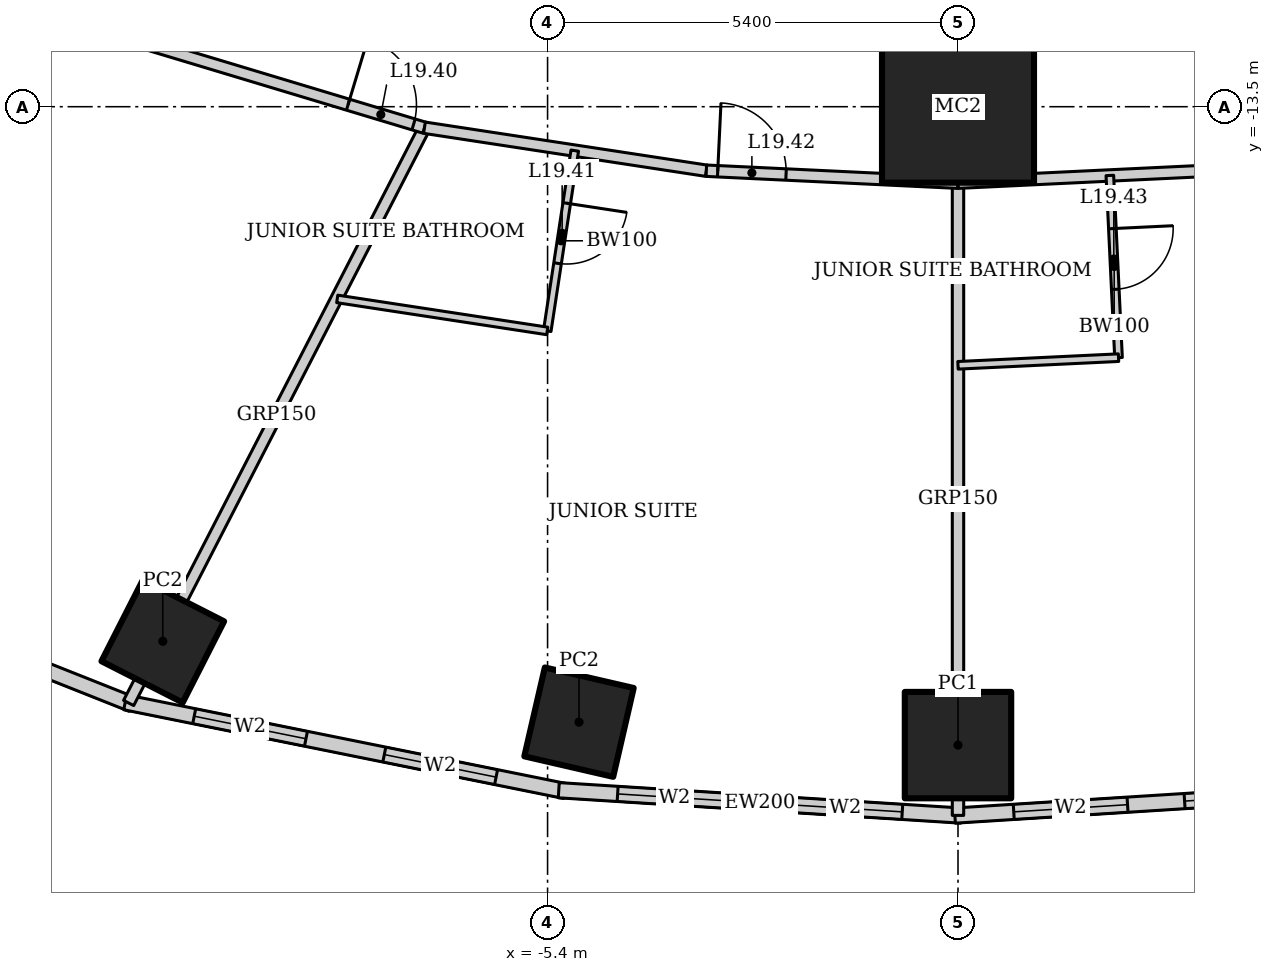
"""IFC4 building model, lengths in metres.
Left out: names, types, materials, properties, quantities, classifications, styles, units other than length and angle.
Written with IfcOpenShell. Run it as: python <this file> out.ifc"""

import sys

from ifc_helpers import new_model, si_unit, direction, frame, frame_2d, origin, origin_2d, place, context, subcontext, project, spatial, rectangle, hollow_rectangle, extrude, element, fill, save


model = new_model("IFC4")
c1 = context("Model", 3, precision=1e-05, world=origin(), true_north=direction((0.0, 1.0)))
c2 = subcontext(c1, "Body", "Model", "MODEL_VIEW")
j1 = project(units=[si_unit("LENGTHUNIT", "METRE"), si_unit("PLANEANGLEUNIT", "RADIAN")], contexts=[c1])
p1 = place(None, origin())
s1 = spatial("IfcSite", under=j1, at=p1, CompositionType="ELEMENT")
p2 = place(p1, origin())
s2 = spatial("IfcBuilding", under=s1, at=p2, CompositionType="ELEMENT")
p3 = place(p2, frame((0.0, 0.0, 83.8)))
s3 = spatial("IfcBuildingStorey", under=s2, at=p3, CompositionType="ELEMENT", Elevation=83.8)
p4 = place(p3, frame((0.0, -13.5, 0.0), z_axis=(0.0, 0.0, 1.0), x_axis=(1.0, 0.0, 0.0)))
e1 = element("IfcColumn", 1, at=p4, inside=s3, PredefinedType="COLUMN", context=c2, shape_type="SweptSolid", body=[
    extrude(hollow_rectangle(XDim=2.0, YDim=2.0, WallThickness=0.17, at=origin_2d()), origin(), (0.0, 0.0, 1.0), 3.6),
])
for number, where, z_axis, x_axis in (
    (2, (-10.463, -20.534, 0.0), (0.0, 0.0, 1.0), (0.454, 0.891, 0.0)),
    (3, (-4.986, -21.598, 0.0), (0.0, 0.0, 1.0), (0.225, 0.974, 0.0)),
):
    element("IfcColumn", number, at=place(p3, frame(where, z_axis=z_axis, x_axis=x_axis)), inside=s3, PredefinedType="COLUMN", context=c2, shape_type="SweptSolid", body=[
        extrude(hollow_rectangle(XDim=1.2, YDim=1.2, WallThickness=0.1, at=origin_2d()), origin(), (0.0, 0.0, 1.0), 3.6),
    ])
p5 = place(p3, frame((0.0, -21.9, 0.0), z_axis=(0.0, 0.0, 1.0), x_axis=(1.0, 0.0, 0.0)))
e4 = element("IfcColumn", 4, at=p5, inside=s3, PredefinedType="COLUMN", context=c2, shape_type="SweptSolid", body=[
    extrude(hollow_rectangle(XDim=1.4, YDim=1.4, WallThickness=0.1, at=origin_2d()), origin(), (0.0, 0.0, 1.0), 3.6),
])
p6 = place(p3, frame((-18.018, -18.523, 0.0), z_axis=(0.0, 0.0, 1.0), x_axis=(0.929358351251, -0.369178892895, 0.0)))
e5 = element("IfcWall", 5, at=p6, inside=s3, PredefinedType="SOLIDWALL", context=c2, shape_type="SweptSolid", body=[
    extrude(rectangle(XDim=7.692, YDim=0.2, at=frame_2d((3.846, 0.0))), origin(), (0.0, 0.0, 1.0), 3.45),
])
p7 = place(p6, frame((1.373, 0.0, 0.5)))
e6 = element("IfcOpeningElement", 6, at=p7, cuts=e5, PredefinedType="OPENING", context=c2, shape_type="SweptSolid", body=[
    extrude(rectangle(XDim=1.5, YDim=2.2, at=frame_2d((0.75, 1.1))), frame((0.0, 0.11, 0.0), z_axis=(0.0, -1.0, 0.0), x_axis=(1.0, 0.0, 0.0)), (0.0, 0.0, 1.0), 0.22),
])
p8 = place(p6, frame((4.819, 0.0, 0.5)))
e7 = element("IfcOpeningElement", 7, at=p8, cuts=e5, PredefinedType="OPENING", context=c2, shape_type="SweptSolid", body=[
    extrude(rectangle(XDim=1.5, YDim=2.2, at=frame_2d((0.75, 1.1))), frame((0.0, 0.11, 0.0), z_axis=(0.0, -1.0, 0.0), x_axis=(1.0, 0.0, 0.0)), (0.0, 0.0, 1.0), 0.22),
])
p9 = place(p3, frame((-10.957, -21.337, 0.0), z_axis=(0.0, 0.0, 1.0), x_axis=(0.980251657452, -0.197754110105, 0.0)))
e8 = element("IfcWall", 8, at=p9, inside=s3, PredefinedType="SOLIDWALL", context=c2, shape_type="SweptSolid", body=[
    extrude(rectangle(XDim=5.904, YDim=0.2, at=frame_2d((2.952, 0.0))), origin(), (0.0, 0.0, 1.0), 3.45),
])
p10 = place(p9, frame((0.926, 0.0, 0.5)))
e9 = element("IfcOpeningElement", 9, at=p10, cuts=e8, PredefinedType="OPENING", context=c2, shape_type="SweptSolid", body=[
    extrude(rectangle(XDim=1.5, YDim=2.2, at=frame_2d((0.75, 1.1))), frame((0.0, 0.11, 0.0), z_axis=(0.0, -1.0, 0.0), x_axis=(1.0, 0.0, 0.0)), (0.0, 0.0, 1.0), 0.22),
])
p11 = place(p9, frame((3.478, 0.0, 0.5)))
e10 = element("IfcOpeningElement", 10, at=p11, cuts=e8, PredefinedType="OPENING", context=c2, shape_type="SweptSolid", body=[
    extrude(rectangle(XDim=1.5, YDim=2.2, at=frame_2d((0.75, 1.1))), frame((0.0, 0.11, 0.0), z_axis=(0.0, -1.0, 0.0), x_axis=(1.0, 0.0, 0.0)), (0.0, 0.0, 1.0), 0.22),
])
p12 = place(p3, frame((-5.253, -22.493, 0.0), z_axis=(0.0, 0.0, 1.0), x_axis=(0.998018582375, -0.062919863585, 0.0)))
e11 = element("IfcWall", 11, at=p12, inside=s3, PredefinedType="SOLIDWALL", context=c2, shape_type="SweptSolid", body=[
    extrude(rectangle(XDim=5.304, YDim=0.2, at=frame_2d((2.652, 0.0))), origin(), (0.0, 0.0, 1.0), 3.45),
])
p13 = place(p12, frame((0.776, 0.0, 0.5)))
e12 = element("IfcOpeningElement", 12, at=p13, cuts=e11, PredefinedType="OPENING", context=c2, shape_type="SweptSolid", body=[
    extrude(rectangle(XDim=1.5, YDim=2.2, at=frame_2d((0.75, 1.1))), frame((0.0, 0.11, 0.0), z_axis=(0.0, -1.0, 0.0), x_axis=(1.0, 0.0, 0.0)), (0.0, 0.0, 1.0), 0.22),
])
p14 = place(p12, frame((3.028, 0.0, 0.5)))
e13 = element("IfcOpeningElement", 13, at=p14, cuts=e11, PredefinedType="OPENING", context=c2, shape_type="SweptSolid", body=[
    extrude(rectangle(XDim=1.5, YDim=2.2, at=frame_2d((0.75, 1.1))), frame((0.0, 0.11, 0.0), z_axis=(0.0, -1.0, 0.0), x_axis=(1.0, 0.0, 0.0)), (0.0, 0.0, 1.0), 0.22),
])
p15 = place(p3, frame((-0.041, -22.827, 0.0), z_axis=(0.0, 0.0, 1.0), x_axis=(0.998018582375, 0.062919863585, 0.0)))
e14 = element("IfcWall", 14, at=p15, inside=s3, PredefinedType="SOLIDWALL", context=c2, shape_type="SweptSolid", body=[
    extrude(rectangle(XDim=5.304, YDim=0.2, at=frame_2d((2.652, 0.0))), origin(), (0.0, 0.0, 1.0), 3.45),
])
p16 = place(p15, frame((0.776, 0.0, 0.5)))
e15 = element("IfcOpeningElement", 15, at=p16, cuts=e14, PredefinedType="OPENING", context=c2, shape_type="SweptSolid", body=[
    extrude(rectangle(XDim=1.5, YDim=2.2, at=frame_2d((0.75, 1.1))), frame((0.0, 0.11, 0.0), z_axis=(0.0, -1.0, 0.0), x_axis=(1.0, 0.0, 0.0)), (0.0, 0.0, 1.0), 0.22),
])
p17 = place(p15, frame((3.028, 0.0, 0.5)))
e16 = element("IfcOpeningElement", 16, at=p17, cuts=e14, PredefinedType="OPENING", context=c2, shape_type="SweptSolid", body=[
    extrude(rectangle(XDim=1.5, YDim=2.2, at=frame_2d((0.75, 1.1))), frame((0.0, 0.11, 0.0), z_axis=(0.0, -1.0, 0.0), x_axis=(1.0, 0.0, 0.0)), (0.0, 0.0, 1.0), 0.22),
])
p18 = place(p3, frame((-10.912, -21.346, 0.0), z_axis=(0.0, 0.0, 1.0), x_axis=(0.457327273085, 0.889298468059, 0.0)))
e17 = element("IfcWall", 17, at=p18, inside=s3, PredefinedType="PARTITIONING", context=c2, shape_type="SweptSolid", body=[
    extrude(rectangle(XDim=8.511, YDim=0.15, at=frame_2d((4.256, 0.0))), origin(), (0.0, 0.0, 1.0), 2.528),
])
p19 = place(p3, frame((0.0, -22.825, 0.0), z_axis=(0.0, 0.0, 1.0), x_axis=(0.0, 1.0, 0.0)))
e18 = element("IfcWall", 18, at=p19, inside=s3, PredefinedType="PARTITIONING", context=c2, shape_type="SweptSolid", body=[
    extrude(rectangle(XDim=8.325, YDim=0.15, at=frame_2d((4.162, 0.0))), origin(), (0.0, 0.0, 1.0), 2.924),
])
p20 = place(p3, frame((-11.888, -12.311, 0.0), z_axis=(0.0, 0.0, 1.0), x_axis=(0.957564241242, -0.288219922793, 0.0)))
e19 = element("IfcWall", 19, at=p20, inside=s3, PredefinedType="PARTITIONING", context=c2, shape_type="SweptSolid", body=[
    extrude(rectangle(XDim=5.085, YDim=0.15, at=frame_2d((2.542, 0.0))), origin(), (0.0, 0.0, 1.0), 3.45),
])
p21 = place(p20, frame((4.035, 0.0, 0.0)))
e20 = element("IfcOpeningElement", 20, at=p21, cuts=e19, PredefinedType="OPENING", context=c2, shape_type="SweptSolid", body=[
    extrude(rectangle(XDim=0.9, YDim=2.1, at=frame_2d((0.45, 1.05))), frame((0.0, 0.085, 0.0), z_axis=(0.0, -1.0, 0.0), x_axis=(1.0, 0.0, 0.0)), (0.0, 0.0, 1.0), 0.17),
])
p22 = place(p3, frame((-7.019, -13.776, 0.0), z_axis=(0.0, 0.0, 1.0), x_axis=(0.988564270062, -0.150800145746, 0.0)))
e21 = element("IfcWall", 21, at=p22, inside=s3, PredefinedType="PARTITIONING", context=c2, shape_type="SweptSolid", body=[
    extrude(rectangle(XDim=3.751, YDim=0.15, at=frame_2d((1.875, 0.0))), origin(), (0.0, 0.0, 1.0), 3.45),
])
p23 = place(p3, frame((-3.311, -14.342, 0.0), z_axis=(0.0, 0.0, 1.0), x_axis=(0.998863968075, -0.047652631422, 0.0)))
e22 = element("IfcWall", 22, at=p23, inside=s3, PredefinedType="PARTITIONING", context=c2, shape_type="SweptSolid", body=[
    extrude(rectangle(XDim=3.315, YDim=0.15, at=frame_2d((1.657, 0.0))), origin(), (0.0, 0.0, 1.0), 3.45),
])
p24 = place(p23, frame((0.15, 0.0, 0.0)))
e23 = element("IfcOpeningElement", 23, at=p24, cuts=e22, PredefinedType="OPENING", context=c2, shape_type="SweptSolid", body=[
    extrude(rectangle(XDim=0.9, YDim=2.1, at=frame_2d((0.45, 1.05))), frame((0.0, 0.085, 0.0), z_axis=(0.0, -1.0, 0.0), x_axis=(1.0, 0.0, 0.0)), (0.0, 0.0, 1.0), 0.17),
])
p25 = place(p3, frame((0.0, -14.5, 0.0), z_axis=(0.0, 0.0, 1.0), x_axis=(0.998863968075, 0.047652631422, 0.0)))
e24 = element("IfcWall", 24, at=p25, inside=s3, PredefinedType="PARTITIONING", context=c2, shape_type="SweptSolid", body=[
    extrude(rectangle(XDim=3.315, YDim=0.15, at=frame_2d((1.657, 0.0))), origin(), (0.0, 0.0, 1.0), 3.45),
])
p26 = place(p3, frame((-5.042, -14.078, 0.0), z_axis=(0.0, 0.0, 1.0), x_axis=(-0.150856962013, -0.988555601376, 0.0)))
e25 = element("IfcWall", 25, at=p26, inside=s3, PredefinedType="PARTITIONING", context=c2, shape_type="SweptSolid", body=[
    extrude(rectangle(XDim=2.4, YDim=0.1, at=frame_2d((1.2, 0.0))), origin(), (0.0, 0.0, 1.0), 3.45),
])
p27 = place(p26, frame((0.7, 0.0, 0.0)))
e26 = element("IfcOpeningElement", 26, at=p27, cuts=e25, PredefinedType="OPENING", context=c2, shape_type="SweptSolid", body=[
    extrude(rectangle(XDim=0.8, YDim=2.1, at=frame_2d((0.4, 1.05))), frame((0.0, 0.06, 0.0), z_axis=(0.0, -1.0, 0.0), x_axis=(1.0, 0.0, 0.0)), (0.0, 0.0, 1.0), 0.12),
])
p28 = place(p3, frame((-5.404, -16.45, 0.0), z_axis=(0.0, 0.0, 1.0), x_axis=(-0.988568792086, 0.150770498819, 0.0)))
e27 = element("IfcWall", 27, at=p28, inside=s3, PredefinedType="PARTITIONING", context=c2, shape_type="SweptSolid", body=[
    extrude(rectangle(XDim=2.795, YDim=0.1, at=frame_2d((1.397, 0.0))), origin(), (0.0, 0.0, 1.0), 3.45),
])
p29 = place(p3, frame((1.998, -14.405, 0.0), z_axis=(0.0, 0.0, 1.0), x_axis=(0.047608648396, -0.998866065395, 0.0)))
e28 = element("IfcWall", 28, at=p29, inside=s3, PredefinedType="PARTITIONING", context=c2, shape_type="SweptSolid", body=[
    extrude(rectangle(XDim=2.4, YDim=0.1, at=frame_2d((1.2, 0.0))), origin(), (0.0, 0.0, 1.0), 2.749),
])
p30 = place(p29, frame((0.7, 0.0, 0.0)))
e29 = element("IfcOpeningElement", 29, at=p30, cuts=e28, PredefinedType="OPENING", context=c2, shape_type="SweptSolid", body=[
    extrude(rectangle(XDim=0.8, YDim=2.1, at=frame_2d((0.4, 1.05))), frame((0.0, 0.06, 0.0), z_axis=(0.0, -1.0, 0.0), x_axis=(1.0, 0.0, 0.0)), (0.0, 0.0, 1.0), 0.12),
])
p31 = place(p3, frame((2.112, -16.802, 0.0), z_axis=(0.0, 0.0, 1.0), x_axis=(-0.998862383453, -0.047685835668, 0.0)))
e30 = element("IfcWall", 30, at=p31, inside=s3, PredefinedType="PARTITIONING", context=c2, shape_type="SweptSolid", body=[
    extrude(rectangle(XDim=2.115, YDim=0.1, at=frame_2d((1.057, 0.0))), origin(), (0.0, 0.0, 1.0), 3.45),
])
p32 = place(p10, origin())
e31 = element("IfcWindow", 31, at=p32, inside=s3, PartitioningType="SINGLE_PANEL", PredefinedType="WINDOW", context=c2, shape_type="SweptSolid", body=[
    extrude(rectangle(XDim=1.5, YDim=2.2, at=frame_2d((0.75, 1.1))), frame((0.0, 0.03, 0.0), z_axis=(0.0, -1.0, 0.0), x_axis=(1.0, 0.0, 0.0)), (0.0, 0.0, 1.0), 0.06),
])
fill(e9, e31)
p33 = place(p11, origin())
e32 = element("IfcWindow", 32, at=p33, inside=s3, PartitioningType="SINGLE_PANEL", PredefinedType="WINDOW", context=c2, shape_type="SweptSolid", body=[
    extrude(rectangle(XDim=1.5, YDim=2.2, at=frame_2d((0.75, 1.1))), frame((0.0, 0.03, 0.0), z_axis=(0.0, -1.0, 0.0), x_axis=(1.0, 0.0, 0.0)), (0.0, 0.0, 1.0), 0.06),
])
fill(e10, e32)
p34 = place(p13, origin())
e33 = element("IfcWindow", 33, at=p34, inside=s3, PartitioningType="SINGLE_PANEL", PredefinedType="WINDOW", context=c2, shape_type="SweptSolid", body=[
    extrude(rectangle(XDim=1.5, YDim=2.2, at=frame_2d((0.75, 1.1))), frame((0.0, 0.03, 0.0), z_axis=(0.0, -1.0, 0.0), x_axis=(1.0, 0.0, 0.0)), (0.0, 0.0, 1.0), 0.06),
])
fill(e12, e33)
p35 = place(p14, origin())
e34 = element("IfcWindow", 34, at=p35, inside=s3, PartitioningType="SINGLE_PANEL", PredefinedType="WINDOW", context=c2, shape_type="SweptSolid", body=[
    extrude(rectangle(XDim=1.5, YDim=2.2, at=frame_2d((0.75, 1.1))), frame((0.0, 0.03, 0.0), z_axis=(0.0, -1.0, 0.0), x_axis=(1.0, 0.0, 0.0)), (0.0, 0.0, 1.0), 0.06),
])
fill(e13, e34)
p36 = place(p16, origin())
e35 = element("IfcWindow", 35, at=p36, inside=s3, PartitioningType="SINGLE_PANEL", PredefinedType="WINDOW", context=c2, shape_type="SweptSolid", body=[
    extrude(rectangle(XDim=1.5, YDim=2.2, at=frame_2d((0.75, 1.1))), frame((0.0, 0.03, 0.0), z_axis=(0.0, -1.0, 0.0), x_axis=(1.0, 0.0, 0.0)), (0.0, 0.0, 1.0), 0.06),
])
fill(e15, e35)
p37 = place(p17, origin())
e36 = element("IfcWindow", 36, at=p37, inside=s3, PartitioningType="SINGLE_PANEL", PredefinedType="WINDOW", context=c2, shape_type="SweptSolid", body=[
    extrude(rectangle(XDim=1.5, YDim=2.2, at=frame_2d((0.75, 1.1))), frame((0.0, 0.03, 0.0), z_axis=(0.0, -1.0, 0.0), x_axis=(1.0, 0.0, 0.0)), (0.0, 0.0, 1.0), 0.06),
])
fill(e16, e36)
p38 = place(p21, origin())
e37 = element("IfcDoor", 37, at=p38, inside=s3, OperationType="SINGLE_SWING_LEFT", PredefinedType="DOOR", context=c2, shape_type="SweptSolid", body=[
    extrude(rectangle(XDim=0.9, YDim=2.1, at=frame_2d((0.45, 1.05))), frame((0.0, 0.025, 0.0), z_axis=(0.0, -1.0, 0.0), x_axis=(1.0, 0.0, 0.0)), (0.0, 0.0, 1.0), 0.05),
])
fill(e20, e37)
p39 = place(p27, origin())
e38 = element("IfcDoor", 38, at=p39, inside=s3, OperationType="SINGLE_SWING_LEFT", PredefinedType="DOOR", context=c2, shape_type="SweptSolid", body=[
    extrude(rectangle(XDim=0.8, YDim=2.1, at=frame_2d((0.4, 1.05))), frame((0.0, 0.025, 0.0), z_axis=(0.0, -1.0, 0.0), x_axis=(1.0, 0.0, 0.0)), (0.0, 0.0, 1.0), 0.05),
])
fill(e26, e38)
p40 = place(p24, origin())
e39 = element("IfcDoor", 39, at=p40, inside=s3, OperationType="SINGLE_SWING_LEFT", PredefinedType="DOOR", context=c2, shape_type="SweptSolid", body=[
    extrude(rectangle(XDim=0.9, YDim=2.1, at=frame_2d((0.45, 1.05))), frame((0.0, 0.025, 0.0), z_axis=(0.0, -1.0, 0.0), x_axis=(1.0, 0.0, 0.0)), (0.0, 0.0, 1.0), 0.05),
])
fill(e23, e39)
p41 = place(p30, origin())
e40 = element("IfcDoor", 40, at=p41, inside=s3, OperationType="SINGLE_SWING_LEFT", PredefinedType="DOOR", context=c2, shape_type="SweptSolid", body=[
    extrude(rectangle(XDim=0.8, YDim=2.1, at=frame_2d((0.4, 1.05))), frame((0.0, 0.025, 0.0), z_axis=(0.0, -1.0, 0.0), x_axis=(1.0, 0.0, 0.0)), (0.0, 0.0, 1.0), 0.05),
])
fill(e29, e40)
save(model, sys.argv[1])
